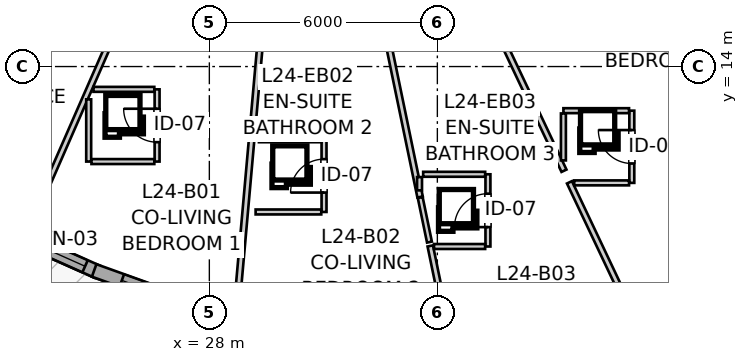
"""IFC4 building model, lengths in metres.
Left out: names, types, materials, properties, quantities, classifications, styles, units other than length and angle.
Written with IfcOpenShell. Run it as: python <this file> out.ifc"""

import sys

from ifc_helpers import new_model, si_unit, direction, frame, frame_2d, origin, place, context, subcontext, project, spatial, rectangle, extrude, source, transform, mapped, element, fill, save


model = new_model("IFC4")
c1 = context("Model", 3, precision=1e-05, world=origin(), true_north=direction((0.0, 1.0)))
c2 = subcontext(c1, "Body", "Model", "MODEL_VIEW")
j1 = project(units=[si_unit("LENGTHUNIT", "METRE"), si_unit("PLANEANGLEUNIT", "RADIAN")], contexts=[c1])
p1 = place(None, origin())
s1 = spatial("IfcSite", under=j1, at=p1, CompositionType="ELEMENT")
p2 = place(p1, origin())
s2 = spatial("IfcBuilding", under=s1, at=p2, CompositionType="ELEMENT")
p3 = place(p2, frame((0.0, 0.0, 83.2)))
s3 = spatial("IfcBuildingStorey", under=s2, at=p3, CompositionType="ELEMENT", Elevation=83.2)
p4 = place(p3, frame((22.503, 9.737, 0.0), z_axis=(0.0, 0.0, 1.0), x_axis=(0.913443049169, -0.406966578388, 0.0)))
e1 = element("IfcWall", 1, at=p4, inside=s3, PredefinedType="SOLIDWALL", context=c2, shape_type="SweptSolid", body=[
    extrude(rectangle(XDim=2.79, YDim=0.35, at=frame_2d((1.395, 0.0))), origin(), (0.0, 0.0, 1.0), 2.465),
])
p5 = place(p4, frame((0.938, 0.0, 0.82)))
e2 = element("IfcOpeningElement", 2, at=p5, cuts=e1, PredefinedType="OPENING", context=c2, shape_type="SweptSolid", body=[
    extrude(rectangle(XDim=1.5, YDim=1.45, at=frame_2d((0.75, 0.725))), frame((0.0, 0.185, 0.0), z_axis=(0.0, -1.0, 0.0), x_axis=(1.0, 0.0, 0.0)), (0.0, 0.0, 1.0), 0.37),
])
p6 = place(p3, frame((24.969, 8.635, 0.0), z_axis=(0.0, 0.0, 1.0), x_axis=(0.941099972293, -0.338128440315, 0.0)))
e3 = element("IfcWall", 3, at=p6, inside=s3, PredefinedType="SOLIDWALL", context=c2, shape_type="SweptSolid", body=[
    extrude(rectangle(XDim=3.028, YDim=0.35, at=frame_2d((1.514, 0.0))), origin(), (0.0, 0.0, 1.0), 2.465),
])
p7 = place(p6, frame((0.774, 0.0, 0.82)))
e4 = element("IfcOpeningElement", 4, at=p7, cuts=e3, PredefinedType="OPENING", context=c2, shape_type="SweptSolid", body=[
    extrude(rectangle(XDim=1.5, YDim=1.45, at=frame_2d((0.75, 0.725))), frame((0.0, 0.185, 0.0), z_axis=(0.0, -1.0, 0.0), x_axis=(1.0, 0.0, 0.0)), (0.0, 0.0, 1.0), 0.37),
])
p8 = place(p3, frame((26.625, 11.5, 0.0), z_axis=(0.0, 0.0, 1.0), x_axis=(0.0, 1.0, 0.0)))
e5 = element("IfcWall", 5, at=p8, inside=s3, PredefinedType="PARTITIONING", context=c2, shape_type="SweptSolid", body=[
    extrude(rectangle(XDim=1.9, YDim=0.13, at=frame_2d((0.95, 0.0))), origin(), (0.0, 0.0, 1.0), 2.935),
])
p9 = place(p8, frame((0.51, 0.0, 0.0)))
e6 = element("IfcOpeningElement", 6, at=p9, cuts=e5, PredefinedType="OPENING", context=c2, shape_type="SweptSolid", body=[
    extrude(rectangle(XDim=0.88, YDim=2.05, at=frame_2d((0.44, 1.025))), frame((0.0, 0.075, 0.0), z_axis=(0.0, -1.0, 0.0), x_axis=(1.0, 0.0, 0.0)), (0.0, 0.0, 1.0), 0.15),
])
p10 = place(p3, frame((31.018, 10.174, 0.0), z_axis=(0.0, 0.0, 1.0), x_axis=(0.0, 1.0, 0.0)))
e7 = element("IfcWall", 7, at=p10, inside=s3, PredefinedType="PARTITIONING", context=c2, shape_type="SweptSolid", body=[
    extrude(rectangle(XDim=1.9, YDim=0.13, at=frame_2d((0.95, 0.0))), origin(), (0.0, 0.0, 1.0), 2.935),
])
p11 = place(p10, frame((0.51, 0.0, 0.0)))
e8 = element("IfcOpeningElement", 8, at=p11, cuts=e7, PredefinedType="OPENING", context=c2, shape_type="SweptSolid", body=[
    extrude(rectangle(XDim=0.88, YDim=2.05, at=frame_2d((0.44, 1.025))), frame((0.0, 0.075, 0.0), z_axis=(0.0, -1.0, 0.0), x_axis=(1.0, 0.0, 0.0)), (0.0, 0.0, 1.0), 0.15),
])
p12 = place(p3, frame((39.117, 10.939, 0.0), z_axis=(0.0, 0.0, 1.0), x_axis=(0.0, 1.0, 0.0)))
e9 = element("IfcWall", 9, at=p12, inside=s3, PredefinedType="PARTITIONING", context=c2, shape_type="SweptSolid", body=[
    extrude(rectangle(XDim=1.9, YDim=0.13, at=frame_2d((0.95, 0.0))), origin(), (0.0, 0.0, 1.0), 2.935),
])
p13 = place(p12, frame((0.51, 0.0, 0.0)))
e10 = element("IfcOpeningElement", 10, at=p13, cuts=e9, PredefinedType="OPENING", context=c2, shape_type="SweptSolid", body=[
    extrude(rectangle(XDim=0.88, YDim=2.05, at=frame_2d((0.44, 1.025))), frame((0.0, 0.075, 0.0), z_axis=(0.0, -1.0, 0.0), x_axis=(1.0, 0.0, 0.0)), (0.0, 0.0, 1.0), 0.15),
])
p14 = place(p3, frame((35.331, 9.265, 0.0), z_axis=(0.0, 0.0, 1.0), x_axis=(0.0, 1.0, 0.0)))
e11 = element("IfcWall", 11, at=p14, inside=s3, PredefinedType="PARTITIONING", context=c2, shape_type="SweptSolid", body=[
    extrude(rectangle(XDim=1.9, YDim=0.13, at=frame_2d((0.95, 0.0))), origin(), (0.0, 0.0, 1.0), 2.935),
])
p15 = place(p14, frame((0.51, 0.0, 0.0)))
e12 = element("IfcOpeningElement", 12, at=p15, cuts=e11, PredefinedType="OPENING", context=c2, shape_type="SweptSolid", body=[
    extrude(rectangle(XDim=0.88, YDim=2.05, at=frame_2d((0.44, 1.025))), frame((0.0, 0.075, 0.0), z_axis=(0.0, -1.0, 0.0), x_axis=(1.0, 0.0, 0.0)), (0.0, 0.0, 1.0), 0.15),
])
p16 = place(p3, frame((28.711, 7.564, 0.0), z_axis=(0.0, 0.0, 1.0), x_axis=(0.088615013812, 0.996065951294, 0.0)))
e13 = element("IfcWall", 13, at=p16, inside=s3, PredefinedType="PARTITIONING", context=c2, shape_type="SweptSolid", body=[
    extrude(rectangle(XDim=7.943, YDim=0.145, at=frame_2d((3.971, 0.0))), origin(), (0.0, 0.0, 1.0), 2.935),
])
p17 = place(p3, frame((23.186, 9.634, 0.0), z_axis=(0.0, 0.0, 1.0), x_axis=(0.400994208685, 0.916080588486, 0.0)))
e14 = element("IfcWall", 14, at=p17, inside=s3, PredefinedType="PARTITIONING", context=c2, shape_type="SweptSolid", body=[
    extrude(rectangle(XDim=6.353, YDim=0.145, at=frame_2d((3.177, 0.0))), origin(), (0.0, 0.0, 1.0), 2.935),
])
p18 = place(p3, frame((38.667, 17.429, 0.0), z_axis=(0.0, 0.0, 1.0), x_axis=(0.696417222112, -0.717637131666, 0.0)))
e15 = element("IfcWall", 15, at=p18, inside=s3, PredefinedType="PARTITIONING", context=c2, shape_type="SweptSolid", body=[
    extrude(rectangle(XDim=6.04, YDim=0.145, at=frame_2d((3.02, 0.0))), origin(), (0.0, 0.0, 1.0), 2.935),
])
p19 = place(p3, frame((32.531, 15.468, 0.0), z_axis=(0.0, 0.0, 1.0), x_axis=(0.202792769077, -0.979221677053, 0.0)))
e16 = element("IfcWall", 16, at=p19, inside=s3, PredefinedType="PARTITIONING", context=c2, shape_type="SweptSolid", body=[
    extrude(rectangle(XDim=5.003, YDim=0.145, at=frame_2d((2.502, 0.0))), origin(), (0.0, 0.0, 1.0), 2.935),
])
p20 = place(p3, frame((37.476, 10.954, 0.0), z_axis=(0.0, 0.0, 1.0), x_axis=(0.428094746621, -0.903733859007, 0.0)))
e17 = element("IfcWall", 17, at=p20, inside=s3, PredefinedType="PARTITIONING", context=c2, shape_type="SweptSolid", body=[
    extrude(rectangle(XDim=4.996, YDim=0.145, at=frame_2d((2.498, 0.0))), origin(), (0.0, 0.0, 1.0), 2.935),
])
p21 = place(p3, frame((35.346, 15.452, 0.0), z_axis=(0.0, 0.0, 1.0), x_axis=(0.428023015228, -0.903767834366, 0.0)))
e18 = element("IfcWall", 18, at=p21, inside=s3, PredefinedType="PARTITIONING", context=c2, shape_type="SweptSolid", body=[
    extrude(rectangle(XDim=4.64, YDim=0.145, at=frame_2d((2.32, 0.0))), origin(), (0.0, 0.0, 1.0), 2.935),
])
p22 = place(p3, frame((33.813, 9.28, 0.0), z_axis=(0.0, 0.0, 1.0), x_axis=(0.202648062782, -0.979251633979, 0.0)))
e19 = element("IfcWall", 19, at=p22, inside=s3, PredefinedType="PARTITIONING", context=c2, shape_type="SweptSolid", body=[
    extrude(rectangle(XDim=3.232, YDim=0.145, at=frame_2d((1.616, 0.0))), origin(), (0.0, 0.0, 1.0), 2.935),
])
p23 = place(p3, frame((24.825, 11.5, 0.0), z_axis=(0.0, 0.0, 1.0), x_axis=(0.0, 1.0, 0.0)))
e20 = element("IfcWall", 20, at=p23, inside=s3, PredefinedType="PARTITIONING", context=c2, shape_type="SweptSolid", body=[
    extrude(rectangle(XDim=1.637, YDim=0.13, at=frame_2d((0.818, 0.0))), origin(), (0.0, 0.0, 1.0), 2.935),
])
p24 = place(p3, frame((33.626, 11.165, 0.0), z_axis=(0.0, 0.0, 1.0), x_axis=(1.0, 0.0, 0.0)))
e21 = element("IfcWall", 21, at=p24, inside=s3, PredefinedType="PARTITIONING", context=c2, shape_type="SweptSolid", body=[
    extrude(rectangle(XDim=1.632, YDim=0.13, at=frame_2d((0.816, 0.0))), origin(), (0.0, 0.0, 1.0), 2.935),
])
p25 = place(p3, frame((24.898, 11.5, 0.0), z_axis=(0.0, 0.0, 1.0), x_axis=(1.0, 0.0, 0.0)))
e22 = element("IfcWall", 22, at=p25, inside=s3, PredefinedType="PARTITIONING", context=c2, shape_type="SweptSolid", body=[
    extrude(rectangle(XDim=1.654, YDim=0.13, at=frame_2d((0.827, 0.0))), origin(), (0.0, 0.0, 1.0), 2.543),
])
p26 = place(p3, frame((29.305, 12.074, 0.0), z_axis=(0.0, 0.0, 1.0), x_axis=(1.0, 0.0, 0.0)))
e23 = element("IfcWall", 23, at=p26, inside=s3, PredefinedType="PARTITIONING", context=c2, shape_type="SweptSolid", body=[
    extrude(rectangle(XDim=1.64, YDim=0.13, at=frame_2d((0.82, 0.0))), origin(), (0.0, 0.0, 1.0), 2.935),
])
p27 = place(p3, frame((29.218, 10.174, 0.0), z_axis=(0.0, 0.0, 1.0), x_axis=(1.0, 0.0, 0.0)))
e24 = element("IfcWall", 24, at=p27, inside=s3, PredefinedType="PARTITIONING", context=c2, shape_type="SweptSolid", body=[
    extrude(rectangle(XDim=1.727, YDim=0.13, at=frame_2d((0.864, 0.0))), origin(), (0.0, 0.0, 1.0), 2.543),
])
p28 = place(p3, frame((37.317, 12.839, 0.0), z_axis=(0.0, 0.0, 1.0), x_axis=(1.0, 0.0, 0.0)))
e25 = element("IfcWall", 25, at=p28, inside=s3, PredefinedType="PARTITIONING", context=c2, shape_type="SweptSolid", body=[
    extrude(rectangle(XDim=1.727, YDim=0.13, at=frame_2d((0.864, 0.0))), origin(), (0.0, 0.0, 1.0), 2.935),
])
p29 = place(p3, frame((24.951, 13.4, 0.0), z_axis=(0.0, 0.0, 1.0), x_axis=(1.0, 0.0, 0.0)))
e26 = element("IfcWall", 26, at=p29, inside=s3, PredefinedType="PARTITIONING", context=c2, shape_type="SweptSolid", body=[
    extrude(rectangle(XDim=1.601, YDim=0.13, at=frame_2d((0.801, 0.0))), origin(), (0.0, 0.0, 1.0), 2.935),
])
p30 = place(p3, frame((37.602, 10.939, 0.0), z_axis=(0.0, 0.0, 1.0), x_axis=(1.0, 0.0, 0.0)))
e27 = element("IfcWall", 27, at=p30, inside=s3, PredefinedType="PARTITIONING", context=c2, shape_type="SweptSolid", body=[
    extrude(rectangle(XDim=1.442, YDim=0.13, at=frame_2d((0.721, 0.0))), origin(), (0.0, 0.0, 1.0), 2.935),
])
p31 = place(p3, frame((37.317, 11.53, 0.0), z_axis=(0.0, 0.0, 1.0), x_axis=(0.0, 1.0, 0.0)))
e28 = element("IfcWall", 28, at=p31, inside=s3, PredefinedType="PARTITIONING", context=c2, shape_type="SweptSolid", body=[
    extrude(rectangle(XDim=1.236, YDim=0.13, at=frame_2d((0.618, 0.0))), origin(), (0.0, 0.0, 1.0), 2.935),
])
p32 = place(p3, frame((33.912, 9.265, 0.0), z_axis=(0.0, 0.0, 1.0), x_axis=(1.0, 0.0, 0.0)))
e29 = element("IfcWall", 29, at=p32, inside=s3, PredefinedType="PARTITIONING", context=c2, shape_type="SweptSolid", body=[
    extrude(rectangle(XDim=1.346, YDim=0.13, at=frame_2d((0.673, 0.0))), origin(), (0.0, 0.0, 1.0), 2.935),
])
p33 = place(p3, frame((33.549, 10.553, 0.0), z_axis=(0.0, 0.0, 1.0), x_axis=(0.202855035592, -0.97920877985, 0.0)))
e30 = element("IfcWall", 30, at=p33, inside=s3, PredefinedType="PARTITIONING", context=c2, shape_type="SweptSolid", body=[
    extrude(rectangle(XDim=1.198, YDim=0.13, at=frame_2d((0.599, 0.0))), origin(), (0.0, 0.0, 1.0), 2.935),
])
p34 = place(p3, frame((33.531, 10.742, 0.0), z_axis=(0.0, 0.0, 1.0), x_axis=(0.0, 1.0, 0.0)))
e31 = element("IfcWall", 31, at=p34, inside=s3, PredefinedType="PARTITIONING", context=c2, shape_type="SweptSolid", body=[
    extrude(rectangle(XDim=0.35, YDim=0.13, at=frame_2d((0.175, 0.0))), origin(), (0.0, 0.0, 1.0), 2.935),
])
m1 = source(origin(), c2, "Body", "SweptSolid", [
    extrude(rectangle(XDim=1.5, YDim=1.45, at=frame_2d((0.75, 0.725))), frame((0.0, 0.03, 0.0), z_axis=(0.0, -1.0, 0.0), x_axis=(1.0, 0.0, 0.0)), (0.0, 0.0, 1.0), 0.06),
])
p35 = place(p5, origin())
e32 = element("IfcWindow", 32, at=p35, inside=s3, PartitioningType="SINGLE_PANEL", PredefinedType="WINDOW", context=c2, shape_type="MappedRepresentation", body=[
    mapped(m1, transform((0.0, 0.0, 0.0), x_axis=(1.0, 0.0, 0.0), y_axis=(0.0, 1.0, 0.0), z_axis=(0.0, 0.0, 1.0), scale=1.0)),
])
fill(e2, e32)
p36 = place(p7, origin())
e33 = element("IfcWindow", 33, at=p36, inside=s3, PartitioningType="SINGLE_PANEL", PredefinedType="WINDOW", context=c2, shape_type="MappedRepresentation", body=[
    mapped(m1, transform((0.0, 0.0, 0.0), x_axis=(1.0, 0.0, 0.0), y_axis=(0.0, 1.0, 0.0), z_axis=(0.0, 0.0, 1.0), scale=1.0)),
])
fill(e4, e33)
m2 = source(origin(), c2, "Body", "SweptSolid", [
    extrude(rectangle(XDim=0.88, YDim=2.05, at=frame_2d((0.44, 1.025))), frame((0.0, 0.025, 0.0), z_axis=(0.0, -1.0, 0.0), x_axis=(1.0, 0.0, 0.0)), (0.0, 0.0, 1.0), 0.05),
])
p37 = place(p9, origin())
e34 = element("IfcDoor", 34, at=p37, inside=s3, OperationType="SINGLE_SWING_RIGHT", PredefinedType="DOOR", context=c2, shape_type="MappedRepresentation", body=[
    mapped(m2, transform((0.0, 0.0, 0.0), x_axis=(1.0, 0.0, 0.0), y_axis=(0.0, 1.0, 0.0), z_axis=(0.0, 0.0, 1.0), scale=1.0)),
])
fill(e6, e34)
p38 = place(p11, origin())
e35 = element("IfcDoor", 35, at=p38, inside=s3, OperationType="SINGLE_SWING_LEFT", PredefinedType="DOOR", context=c2, shape_type="MappedRepresentation", body=[
    mapped(m2, transform((0.0, 0.0, 0.0), x_axis=(1.0, 0.0, 0.0), y_axis=(0.0, 1.0, 0.0), z_axis=(0.0, 0.0, 1.0), scale=1.0)),
])
fill(e8, e35)
p39 = place(p13, origin())
e36 = element("IfcDoor", 36, at=p39, inside=s3, OperationType="SINGLE_SWING_RIGHT", PredefinedType="DOOR", context=c2, shape_type="MappedRepresentation", body=[
    mapped(m2, transform((0.0, 0.0, 0.0), x_axis=(1.0, 0.0, 0.0), y_axis=(0.0, 1.0, 0.0), z_axis=(0.0, 0.0, 1.0), scale=1.0)),
])
fill(e10, e36)
p40 = place(p15, origin())
e37 = element("IfcDoor", 37, at=p40, inside=s3, OperationType="SINGLE_SWING_LEFT", PredefinedType="DOOR", context=c2, shape_type="MappedRepresentation", body=[
    mapped(m2, transform((0.0, 0.0, 0.0), x_axis=(1.0, 0.0, 0.0), y_axis=(0.0, 1.0, 0.0), z_axis=(0.0, 0.0, 1.0), scale=1.0)),
])
fill(e12, e37)
save(model, sys.argv[1])
